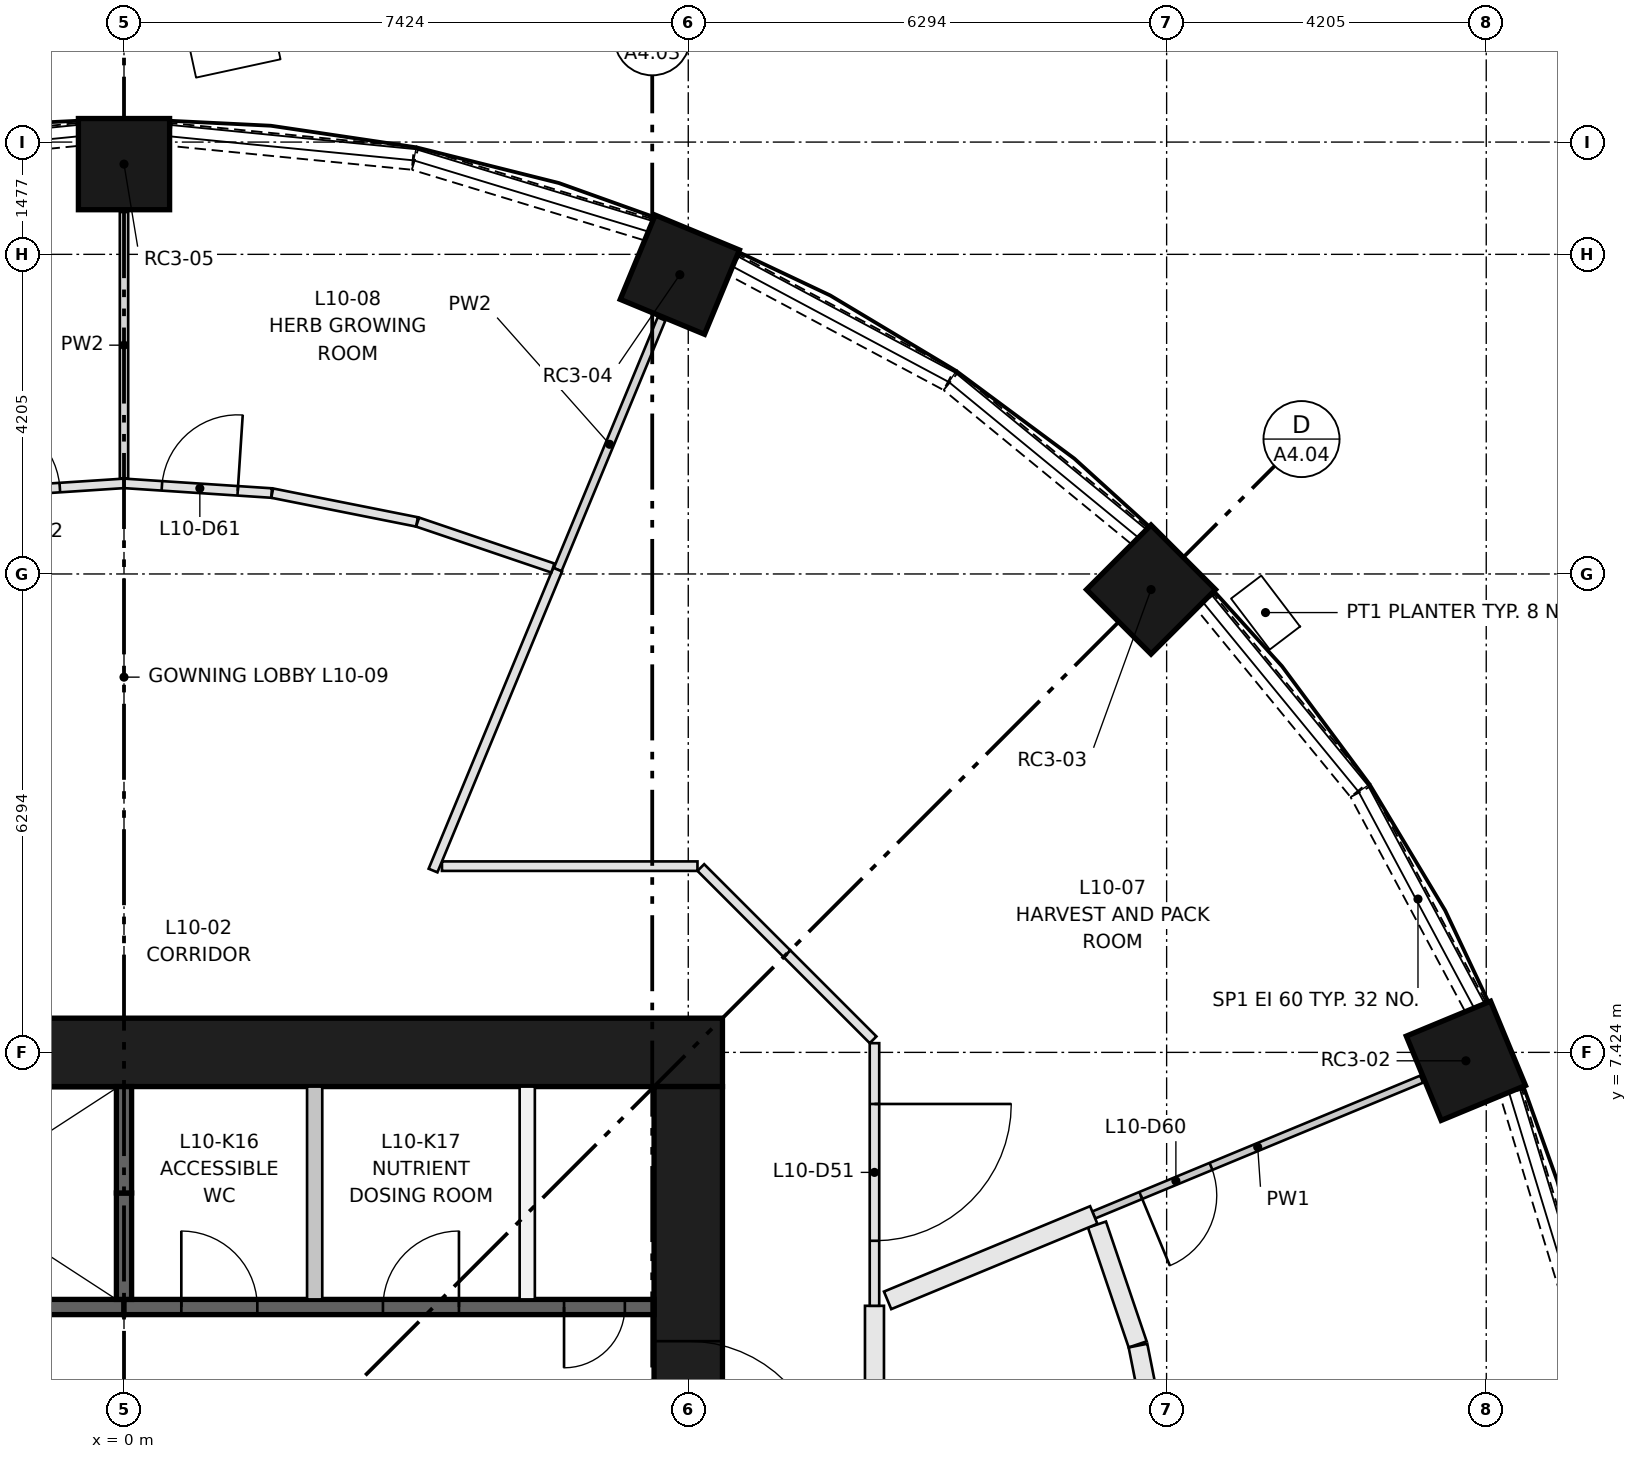
"""IFC4 building model, lengths in metres.
Left out: names, types, materials, properties, quantities, classifications, styles, units other than length and angle.
Written with IfcOpenShell. Run it as: python <this file> out.ifc"""

import sys

from ifc_helpers import new_model, si_unit, direction, frame, frame_2d, origin, origin_2d, place, context, subcontext, project, spatial, rectangle, extrude, element, fill, save


model = new_model("IFC4")
c1 = context("Model", 3, precision=1e-05, world=origin(), true_north=direction((0.0, 1.0)))
c2 = subcontext(c1, "Body", "Model", "MODEL_VIEW")
j1 = project(units=[si_unit("LENGTHUNIT", "METRE"), si_unit("PLANEANGLEUNIT", "RADIAN")], contexts=[c1])
p1 = place(None, origin())
s1 = spatial("IfcSite", under=j1, at=p1, CompositionType="ELEMENT")
p2 = place(p1, origin())
s2 = spatial("IfcBuilding", under=s1, at=p2, CompositionType="ELEMENT")
p3 = place(p2, frame((0.0, 0.0, 40.8)))
s3 = spatial("IfcBuildingStorey", under=s2, at=p3, CompositionType="ELEMENT", Elevation=40.8)
for number, where, z_axis, x_axis in (
    (1, (17.655, 7.313, 0.0), (0.0, 0.0, 1.0), (0.924, 0.383, 0.0)),
    (2, (13.513, 13.513, 0.0), (0.0, 0.0, 1.0), (0.707, 0.707, 0.0)),
    (3, (7.313, 17.655, 0.0), (0.0, 0.0, 1.0), (0.383, 0.924, 0.0)),
    (4, (0.0, 19.11, 0.0), (0.0, 0.0, 1.0), (0.0, 1.0, 0.0)),
):
    element("IfcColumn", number, at=place(p3, frame(where, z_axis=z_axis, x_axis=x_axis)), inside=s3, PredefinedType="COLUMN", context=c2, shape_type="SweptSolid", body=[
        extrude(rectangle(XDim=1.2, YDim=1.2, at=origin_2d()), origin(), (0.0, 0.0, 1.0), 3.65),
    ])
p4 = place(p3, frame((-7.874, 7.424, 0.0), z_axis=(0.0, 0.0, 1.0), x_axis=(1.0, 0.0, 0.0)))
e5 = element("IfcWall", 5, at=p4, inside=s3, PredefinedType="SHEAR", context=c2, shape_type="SweptSolid", body=[
    extrude(rectangle(XDim=15.748, YDim=0.9, at=frame_2d((7.874, 0.0))), origin(), (0.0, 0.0, 1.0), 3.65),
])
p5 = place(p3, frame((7.424, -6.974, 0.0), z_axis=(0.0, 0.0, 1.0), x_axis=(0.0, 1.0, 0.0)))
e6 = element("IfcWall", 6, at=p5, inside=s3, PredefinedType="SHEAR", context=c2, shape_type="SweptSolid", body=[
    extrude(rectangle(XDim=13.948, YDim=0.9, at=frame_2d((6.974, 0.0))), origin(), (0.0, 0.0, 1.0), 3.65),
])
p6 = place(p5, frame((6.474, 0.0, 0.0)))
e7 = element("IfcOpeningElement", 7, at=p6, cuts=e6, PredefinedType="OPENING", context=c2, shape_type="SweptSolid", body=[
    extrude(rectangle(XDim=1.0, YDim=2.1, at=frame_2d((0.5, 1.05))), frame((0.0, 0.46, 0.0), z_axis=(0.0, -1.0, 0.0), x_axis=(1.0, 0.0, 0.0)), (0.0, 0.0, 1.0), 0.92),
])
p7 = place(p5, frame((3.35, 0.0, 0.0)))
e8 = element("IfcOpeningElement", 8, at=p7, cuts=e6, PredefinedType="OPENING", context=c2, shape_type="SweptSolid", body=[
    extrude(rectangle(XDim=1.8, YDim=2.1, at=frame_2d((0.9, 1.05))), frame((0.0, 0.46, 0.0), z_axis=(0.0, -1.0, 0.0), x_axis=(1.0, 0.0, 0.0)), (0.0, 0.0, 1.0), 0.92),
])
p8 = place(p5, frame((8.799, 0.0, 0.0)))
e9 = element("IfcOpeningElement", 9, at=p8, cuts=e6, PredefinedType="OPENING", context=c2, shape_type="SweptSolid", body=[
    extrude(rectangle(XDim=1.8, YDim=2.1, at=frame_2d((0.9, 1.05))), frame((0.0, 0.46, 0.0), z_axis=(0.0, -1.0, 0.0), x_axis=(1.0, 0.0, 0.0)), (0.0, 0.0, 1.0), 0.92),
])
p9 = place(p3, frame((-6.974, 4.074, 0.0), z_axis=(0.0, 0.0, 1.0), x_axis=(1.0, 0.0, 0.0)))
e10 = element("IfcWall", 10, at=p9, inside=s3, PredefinedType="SHEAR", context=c2, shape_type="SweptSolid", body=[
    extrude(rectangle(XDim=6.974, YDim=0.2, at=frame_2d((3.487, 0.0))), origin(), (0.0, 0.0, 1.0), 3.3),
])
p10 = place(p3, frame((0.0, 4.074, 0.0), z_axis=(0.0, 0.0, 1.0), x_axis=(1.0, 0.0, 0.0)))
e11 = element("IfcWall", 11, at=p10, inside=s3, PredefinedType="SHEAR", context=c2, shape_type="SweptSolid", body=[
    extrude(rectangle(XDim=6.974, YDim=0.2, at=frame_2d((3.487, 0.0))), origin(), (0.0, 0.0, 1.0), 3.3),
])
p11 = place(p10, frame((0.754, 0.0, 0.0)))
e12 = element("IfcOpeningElement", 12, at=p11, cuts=e11, PredefinedType="OPENING", context=c2, shape_type="SweptSolid", body=[
    extrude(rectangle(XDim=1.0, YDim=2.1, at=frame_2d((0.5, 1.05))), frame((0.0, 0.11, 0.0), z_axis=(0.0, -1.0, 0.0), x_axis=(1.0, 0.0, 0.0)), (0.0, 0.0, 1.0), 0.22),
])
p12 = place(p10, frame((3.407, 0.0, 0.0)))
e13 = element("IfcOpeningElement", 13, at=p12, cuts=e11, PredefinedType="OPENING", context=c2, shape_type="SweptSolid", body=[
    extrude(rectangle(XDim=1.0, YDim=2.1, at=frame_2d((0.5, 1.05))), frame((0.0, 0.11, 0.0), z_axis=(0.0, -1.0, 0.0), x_axis=(1.0, 0.0, 0.0)), (0.0, 0.0, 1.0), 0.22),
])
p13 = place(p10, frame((5.79, 0.0, 0.0)))
e14 = element("IfcOpeningElement", 14, at=p13, cuts=e11, PredefinedType="OPENING", context=c2, shape_type="SweptSolid", body=[
    extrude(rectangle(XDim=0.8, YDim=2.1, at=frame_2d((0.4, 1.05))), frame((0.0, 0.11, 0.0), z_axis=(0.0, -1.0, 0.0), x_axis=(1.0, 0.0, 0.0)), (0.0, 0.0, 1.0), 0.22),
])
p14 = place(p3, frame((0.0, 4.174, 0.0), z_axis=(0.0, 0.0, 1.0), x_axis=(0.0, 1.0, 0.0)))
e15 = element("IfcWall", 15, at=p14, inside=s3, PredefinedType="SHEAR", context=c2, shape_type="SweptSolid", body=[
    extrude(rectangle(XDim=1.4, YDim=0.2, at=frame_2d((0.7, 0.0))), origin(), (0.0, 0.0, 1.0), 3.3),
])
p15 = place(p3, frame((0.0, 5.574, 0.0), z_axis=(0.0, 0.0, 1.0), x_axis=(0.0, 1.0, 0.0)))
e16 = element("IfcWall", 16, at=p15, inside=s3, PredefinedType="SHEAR", context=c2, shape_type="SweptSolid", body=[
    extrude(rectangle(XDim=1.4, YDim=0.2, at=frame_2d((0.7, 0.0))), origin(), (0.0, 0.0, 1.0), 3.3),
])
for number, where, z_axis, x_axis in (
    (17, (2.509, 4.174, 0.0), (0.0, 0.0, 1.0), (0.0, 1.0, 0.0)),
    (18, (5.305, 4.174, 0.0), (0.0, 0.0, 1.0), (0.0, 1.0, 0.0)),
):
    element("IfcWall", number, at=place(p3, frame(where, z_axis=z_axis, x_axis=x_axis)), inside=s3, PredefinedType="PARTITIONING", context=c2, shape_type="SweptSolid", body=[
        extrude(rectangle(XDim=2.8, YDim=0.2, at=frame_2d((1.4, 0.0))), origin(), (0.0, 0.0, 1.0), 3.3),
    ])
p16 = place(p3, frame((19.18, 3.83, 0.0), z_axis=(0.0, 0.0, 1.0), x_axis=(-0.290472877795, 0.956883225512, 0.0)))
e19 = element("IfcWall", 19, at=p16, inside=s3, PredefinedType="SOLIDWALL", context=c2, shape_type="SweptSolid", body=[
    extrude(rectangle(XDim=3.202, YDim=0.3, at=frame_2d((1.601, 0.0))), origin(), (0.0, 0.0, 1.0), 0.9),
])
p17 = place(p3, frame((17.78, 8.028, 0.0), z_axis=(0.0, 0.0, 1.0), x_axis=(-0.471284265614, 0.881981372243, 0.0)))
e20 = element("IfcWall", 20, at=p17, inside=s3, PredefinedType="SOLIDWALL", context=c2, shape_type="SweptSolid", body=[
    extrude(rectangle(XDim=3.204, YDim=0.3, at=frame_2d((1.602, 0.0))), origin(), (0.0, 0.0, 1.0), 0.9),
])
for number, where, z_axis, x_axis in (
    (21, (16.253, 10.879, 0.0), (0.0, 0.0, 1.0), (-0.634, 0.773, 0.0)),
    (22, (13.354, 14.222, 0.0), (0.0, 0.0, 1.0), (-0.773, 0.634, 0.0)),
):
    element("IfcWall", number, at=place(p3, frame(where, z_axis=z_axis, x_axis=x_axis)), inside=s3, PredefinedType="SOLIDWALL", context=c2, shape_type="SweptSolid", body=[
        extrude(rectangle(XDim=3.202, YDim=0.3, at=frame_2d((1.601, 0.0))), origin(), (0.0, 0.0, 1.0), 0.9),
    ])
p18 = place(p3, frame((10.854, 16.27, 0.0), z_axis=(0.0, 0.0, 1.0), x_axis=(-0.881981372243, 0.471284265614, 0.0)))
e23 = element("IfcWall", 23, at=p18, inside=s3, PredefinedType="SOLIDWALL", context=c2, shape_type="SweptSolid", body=[
    extrude(rectangle(XDim=3.204, YDim=0.3, at=frame_2d((1.602, 0.0))), origin(), (0.0, 0.0, 1.0), 0.9),
])
p19 = place(p3, frame((6.895, 18.25, 0.0), z_axis=(0.0, 0.0, 1.0), x_axis=(-0.956883225512, 0.290472877795, 0.0)))
e24 = element("IfcWall", 24, at=p19, inside=s3, PredefinedType="SOLIDWALL", context=c2, shape_type="SweptSolid", body=[
    extrude(rectangle(XDim=3.202, YDim=0.3, at=frame_2d((1.601, 0.0))), origin(), (0.0, 0.0, 1.0), 0.9),
])
for number, where, z_axis, x_axis in (
    (25, (3.801, 19.186, 0.0), (0.0, 0.0, 1.0), (-0.995, 0.098, 0.0)),
    (26, (-0.613, 19.5, 0.0), (0.0, 0.0, 1.0), (-0.995, -0.098, 0.0)),
):
    element("IfcWall", number, at=place(p3, frame(where, z_axis=z_axis, x_axis=x_axis)), inside=s3, PredefinedType="SOLIDWALL", context=c2, shape_type="SweptSolid", body=[
        extrude(rectangle(XDim=3.204, YDim=0.3, at=frame_2d((1.602, 0.0))), origin(), (0.0, 0.0, 1.0), 0.9),
    ])
p20 = place(p3, frame((9.874, 4.09, 0.0), z_axis=(0.0, 0.0, 1.0), x_axis=(0.0, -1.0, 0.0)))
e27 = element("IfcWall", 27, at=p20, inside=s3, PredefinedType="PARTITIONING", context=c2, shape_type="SweptSolid", body=[
    extrude(rectangle(XDim=4.09, YDim=0.25, at=frame_2d((2.045, 0.0))), origin(), (0.0, 0.0, 1.0), 3.3),
])
p21 = place(p20, frame((1.5, 0.0, 0.0)))
e28 = element("IfcOpeningElement", 28, at=p21, cuts=e27, PredefinedType="OPENING", context=c2, shape_type="SweptSolid", body=[
    extrude(rectangle(XDim=1.0, YDim=2.1, at=frame_2d((0.5, 1.05))), frame((0.0, 0.135, 0.0), z_axis=(0.0, -1.0, 0.0), x_axis=(1.0, 0.0, 0.0)), (0.0, 0.0, 1.0), 0.27),
])
p22 = place(p3, frame((8.722, 8.722, 0.0), z_axis=(0.0, 0.0, 1.0), x_axis=(0.70718294931, -0.707030604857, 0.0)))
e29 = element("IfcWall", 29, at=p22, inside=s3, PredefinedType="PARTITIONING", context=c2, shape_type="SweptSolid", body=[
    extrude(rectangle(XDim=1.603, YDim=0.125, at=frame_2d((0.801, 0.0))), origin(), (0.0, 0.0, 1.0), 3.3),
])
p23 = place(p3, frame((9.874, 7.545, 0.0), z_axis=(0.0, 0.0, 1.0), x_axis=(0.0, -1.0, 0.0)))
e30 = element("IfcWall", 30, at=p23, inside=s3, PredefinedType="PARTITIONING", context=c2, shape_type="SweptSolid", body=[
    extrude(rectangle(XDim=3.455, YDim=0.125, at=frame_2d((1.728, 0.0))), origin(), (0.0, 0.0, 1.0), 3.3),
])
p24 = place(p23, frame((0.8, 0.0, 0.0)))
e31 = element("IfcOpeningElement", 31, at=p24, cuts=e30, PredefinedType="OPENING", context=c2, shape_type="SweptSolid", body=[
    extrude(rectangle(XDim=1.8, YDim=2.1, at=frame_2d((0.9, 1.05))), frame((0.0, 0.073, 0.0), z_axis=(0.0, -1.0, 0.0), x_axis=(1.0, 0.0, 0.0)), (0.0, 0.0, 1.0), 0.145),
])
p25 = place(p3, frame((4.183, 9.874, 0.0), z_axis=(0.0, 0.0, 1.0), x_axis=(1.0, 0.0, 0.0)))
e32 = element("IfcWall", 32, at=p25, inside=s3, PredefinedType="PARTITIONING", context=c2, shape_type="SweptSolid", body=[
    extrude(rectangle(XDim=3.362, YDim=0.125, at=frame_2d((1.681, 0.0))), origin(), (0.0, 0.0, 1.0), 3.3),
])
p26 = place(p3, frame((7.589, 9.856, 0.0), z_axis=(0.0, 0.0, 1.0), x_axis=(0.707030604857, -0.70718294931, 0.0)))
e33 = element("IfcWall", 33, at=p26, inside=s3, PredefinedType="PARTITIONING", context=c2, shape_type="SweptSolid", body=[
    extrude(rectangle(XDim=1.603, YDim=0.125, at=frame_2d((0.801, 0.0))), origin(), (0.0, 0.0, 1.0), 3.3),
])
p27 = place(p3, frame((13.337, 3.582, 0.0), z_axis=(0.0, 0.0, 1.0), x_axis=(-0.321458381335, 0.946923708157, 0.0)))
e34 = element("IfcWall", 34, at=p27, inside=s3, PredefinedType="PARTITIONING", context=c2, shape_type="SweptSolid", body=[
    extrude(rectangle(XDim=1.665, YDim=0.25, at=frame_2d((0.833, 0.0))), origin(), (0.0, 0.0, 1.0), 3.3),
])
p28 = place(p3, frame((13.69, 1.811, 0.0), z_axis=(0.0, 0.0, 1.0), x_axis=(-0.195014530736, 0.980800353182, 0.0)))
e35 = element("IfcWall", 35, at=p28, inside=s3, PredefinedType="PARTITIONING", context=c2, shape_type="SweptSolid", body=[
    extrude(rectangle(XDim=1.79, YDim=0.25, at=frame_2d((0.895, 0.0))), origin(), (0.0, 0.0, 1.0), 3.3),
])
p29 = place(p3, frame((17.073, 7.072, 0.0), z_axis=(0.0, 0.0, 1.0), x_axis=(-0.92387920118, -0.382684232268, 0.0)))
e36 = element("IfcWall", 36, at=p29, inside=s3, PredefinedType="PARTITIONING", context=c2, shape_type="SweptSolid", body=[
    extrude(rectangle(XDim=4.67, YDim=0.1, at=frame_2d((2.335, 0.0))), origin(), (0.0, 0.0, 1.0), 3.3),
])
p30 = place(p29, frame((3.0, 0.0, 0.0)))
e37 = element("IfcOpeningElement", 37, at=p30, cuts=e36, PredefinedType="OPENING", context=c2, shape_type="SweptSolid", body=[
    extrude(rectangle(XDim=1.0, YDim=2.1, at=frame_2d((0.5, 1.05))), frame((0.0, 0.06, 0.0), z_axis=(0.0, -1.0, 0.0), x_axis=(1.0, 0.0, 0.0)), (0.0, 0.0, 1.0), 0.12),
])
p31 = place(p3, frame((10.047, 4.162, 0.0), z_axis=(0.0, 0.0, 1.0), x_axis=(0.92388200997, 0.382677451195, 0.0)))
e38 = element("IfcWall", 38, at=p31, inside=s3, PredefinedType="PARTITIONING", context=c2, shape_type="SweptSolid", body=[
    extrude(rectangle(XDim=2.935, YDim=0.25, at=frame_2d((1.468, 0.0))), origin(), (0.0, 0.0, 1.0), 3.3),
])
p32 = place(p3, frame((5.706, 13.775, 0.0), z_axis=(0.0, 0.0, 1.0), x_axis=(0.382706138858, 0.923870126847, 0.0)))
e39 = element("IfcWall", 39, at=p32, inside=s3, PredefinedType="PARTITIONING", context=c2, shape_type="SweptSolid", body=[
    extrude(rectangle(XDim=3.57, YDim=0.11, at=frame_2d((1.785, 0.0))), origin(), (0.0, 0.0, 1.0), 3.3),
])
p33 = place(p3, frame((4.066, 9.816, 0.0), z_axis=(0.0, 0.0, 1.0), x_axis=(0.382709065586, 0.923868914467, 0.0)))
e40 = element("IfcWall", 40, at=p33, inside=s3, PredefinedType="PARTITIONING", context=c2, shape_type="SweptSolid", body=[
    extrude(rectangle(XDim=4.285, YDim=0.125, at=frame_2d((2.143, 0.0))), origin(), (0.0, 0.0, 1.0), 3.3),
])
p34 = place(p3, frame((0.0, 14.91, 0.0), z_axis=(0.0, 0.0, 1.0), x_axis=(0.997861646388, -0.065361568741, 0.0)))
e41 = element("IfcWall", 41, at=p34, inside=s3, PredefinedType="PARTITIONING", context=c2, shape_type="SweptSolid", body=[
    extrude(rectangle(XDim=1.946, YDim=0.125, at=frame_2d((0.973, 0.0))), origin(), (0.0, 0.0, 1.0), 3.3),
])
p35 = place(p34, frame((0.5, 0.0, 0.0)))
e42 = element("IfcOpeningElement", 42, at=p35, cuts=e41, PredefinedType="OPENING", context=c2, shape_type="SweptSolid", body=[
    extrude(rectangle(XDim=1.0, YDim=2.1, at=frame_2d((0.5, 1.05))), frame((0.0, 0.073, 0.0), z_axis=(0.0, -1.0, 0.0), x_axis=(1.0, 0.0, 0.0)), (0.0, 0.0, 1.0), 0.145),
])
p36 = place(p3, frame((3.855, 14.403, 0.0), z_axis=(0.0, 0.0, 1.0), x_axis=(-0.980807266515, 0.194979757801, 0.0)))
e43 = element("IfcWall", 43, at=p36, inside=s3, PredefinedType="PARTITIONING", context=c2, shape_type="SweptSolid", body=[
    extrude(rectangle(XDim=1.942, YDim=0.125, at=frame_2d((0.971, 0.0))), origin(), (0.0, 0.0, 1.0), 3.3),
])
p37 = place(p3, frame((5.643, 13.796, 0.0), z_axis=(0.0, 0.0, 1.0), x_axis=(-0.946915165682, 0.321483543904, 0.0)))
e44 = element("IfcWall", 44, at=p37, inside=s3, PredefinedType="PARTITIONING", context=c2, shape_type="SweptSolid", body=[
    extrude(rectangle(XDim=1.88, YDim=0.125, at=frame_2d((0.94, 0.0))), origin(), (0.0, 0.0, 1.0), 3.3),
])
p38 = place(p3, frame((0.0, 14.976, 0.0), z_axis=(0.0, 0.0, 1.0), x_axis=(0.0, 1.0, 0.0)))
e45 = element("IfcWall", 45, at=p38, inside=s3, PredefinedType="PARTITIONING", context=c2, shape_type="SweptSolid", body=[
    extrude(rectangle(XDim=3.504, YDim=0.11, at=frame_2d((1.752, 0.0))), origin(), (0.0, 0.0, 1.0), 3.3),
])
p39 = place(p3, frame((-1.942, 14.783, 0.0), z_axis=(0.0, 0.0, 1.0), x_axis=(0.997861646388, 0.065361568741, 0.0)))
e46 = element("IfcWall", 46, at=p39, inside=s3, PredefinedType="PARTITIONING", context=c2, shape_type="SweptSolid", body=[
    extrude(rectangle(XDim=1.946, YDim=0.125, at=frame_2d((0.973, 0.0))), origin(), (0.0, 0.0, 1.0), 3.3),
])
p40 = place(p39, frame((0.1, 0.0, 0.0)))
e47 = element("IfcOpeningElement", 47, at=p40, cuts=e46, PredefinedType="OPENING", context=c2, shape_type="SweptSolid", body=[
    extrude(rectangle(XDim=1.0, YDim=2.1, at=frame_2d((0.5, 1.05))), frame((0.0, 0.073, 0.0), z_axis=(0.0, -1.0, 0.0), x_axis=(1.0, 0.0, 0.0)), (0.0, 0.0, 1.0), 0.145),
])
p41 = place(p11, origin())
e48 = element("IfcDoor", 48, at=p41, inside=s3, OperationType="SINGLE_SWING_LEFT", PredefinedType="DOOR", context=c2, shape_type="SweptSolid", body=[
    extrude(rectangle(XDim=1.0, YDim=2.1, at=frame_2d((0.5, 1.05))), frame((0.0, 0.025, 0.0), z_axis=(0.0, -1.0, 0.0), x_axis=(1.0, 0.0, 0.0)), (0.0, 0.0, 1.0), 0.05),
])
fill(e12, e48)
p42 = place(p12, origin())
e49 = element("IfcDoor", 49, at=p42, inside=s3, OperationType="SINGLE_SWING_RIGHT", PredefinedType="DOOR", context=c2, shape_type="SweptSolid", body=[
    extrude(rectangle(XDim=1.0, YDim=2.1, at=frame_2d((0.5, 1.05))), frame((0.0, 0.025, 0.0), z_axis=(0.0, -1.0, 0.0), x_axis=(1.0, 0.0, 0.0)), (0.0, 0.0, 1.0), 0.05),
])
fill(e13, e49)
p43 = place(p13, frame((0.8, 0.0, 0.0), z_axis=(0.0, 0.0, 1.0), x_axis=(-1.0, 0.0, 0.0)))
e50 = element("IfcDoor", 50, at=p43, inside=s3, OperationType="SINGLE_SWING_LEFT", PredefinedType="DOOR", context=c2, shape_type="SweptSolid", body=[
    extrude(rectangle(XDim=0.8, YDim=2.1, at=frame_2d((0.4, 1.05))), frame((0.0, 0.025, 0.0), z_axis=(0.0, -1.0, 0.0), x_axis=(1.0, 0.0, 0.0)), (0.0, 0.0, 1.0), 0.05),
])
fill(e14, e50)
p44 = place(p8, frame((1.8, 0.0, 0.0), z_axis=(0.0, 0.0, 1.0), x_axis=(-1.0, 0.0, 0.0)))
e51 = element("IfcDoor", 51, at=p44, inside=s3, OperationType="DOUBLE_DOOR_SINGLE_SWING", PredefinedType="DOOR", context=c2, shape_type="SweptSolid", body=[
    extrude(rectangle(XDim=1.8, YDim=2.1, at=frame_2d((0.9, 1.05))), frame((0.0, 0.025, 0.0), z_axis=(0.0, -1.0, 0.0), x_axis=(1.0, 0.0, 0.0)), (0.0, 0.0, 1.0), 0.05),
])
fill(e9, e51)
p45 = place(p24, origin())
e52 = element("IfcDoor", 52, at=p45, inside=s3, OperationType="DOUBLE_DOOR_SINGLE_SWING", PredefinedType="DOOR", context=c2, shape_type="SweptSolid", body=[
    extrude(rectangle(XDim=1.8, YDim=2.1, at=frame_2d((0.9, 1.05))), frame((0.0, 0.025, 0.0), z_axis=(0.0, -1.0, 0.0), x_axis=(1.0, 0.0, 0.0)), (0.0, 0.0, 1.0), 0.05),
])
fill(e31, e52)
p46 = place(p30, origin())
e53 = element("IfcDoor", 53, at=p46, inside=s3, OperationType="SINGLE_SWING_RIGHT", PredefinedType="DOOR", context=c2, shape_type="SweptSolid", body=[
    extrude(rectangle(XDim=1.0, YDim=2.1, at=frame_2d((0.5, 1.05))), frame((0.0, 0.025, 0.0), z_axis=(0.0, -1.0, 0.0), x_axis=(1.0, 0.0, 0.0)), (0.0, 0.0, 1.0), 0.05),
])
fill(e37, e53)
p47 = place(p35, origin())
e54 = element("IfcDoor", 54, at=p47, inside=s3, OperationType="SINGLE_SWING_RIGHT", PredefinedType="DOOR", context=c2, shape_type="SweptSolid", body=[
    extrude(rectangle(XDim=1.0, YDim=2.1, at=frame_2d((0.5, 1.05))), frame((0.0, 0.025, 0.0), z_axis=(0.0, -1.0, 0.0), x_axis=(1.0, 0.0, 0.0)), (0.0, 0.0, 1.0), 0.05),
])
fill(e42, e54)
p48 = place(p40, origin())
e55 = element("IfcDoor", 55, at=p48, inside=s3, OperationType="SINGLE_SWING_LEFT", PredefinedType="DOOR", context=c2, shape_type="SweptSolid", body=[
    extrude(rectangle(XDim=1.0, YDim=2.1, at=frame_2d((0.5, 1.05))), frame((0.0, 0.025, 0.0), z_axis=(0.0, -1.0, 0.0), x_axis=(1.0, 0.0, 0.0)), (0.0, 0.0, 1.0), 0.05),
])
fill(e47, e55)
save(model, sys.argv[1])
